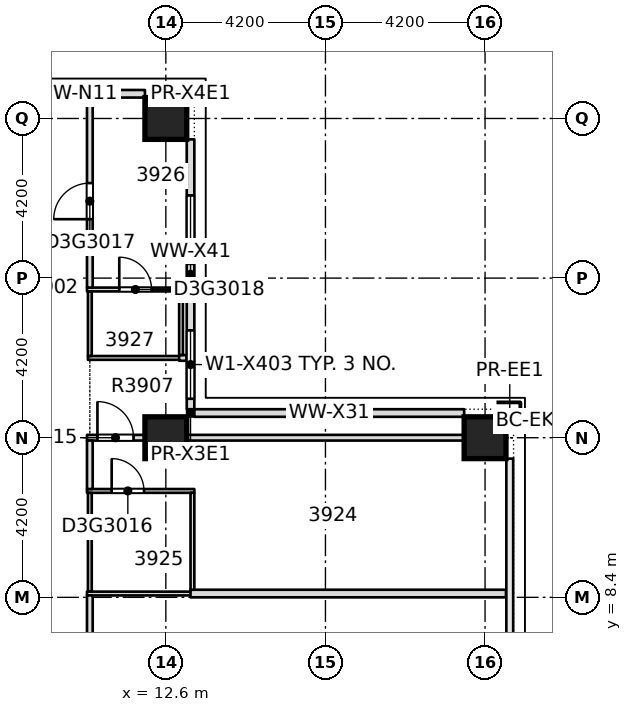
"""IFC4 building model, lengths in metres.
Left out: names, types, materials, properties, quantities, classifications, styles, units other than length and angle.
Written with IfcOpenShell. Run it as: python <this file> out.ifc"""

import sys

from ifc_helpers import new_model, si_unit, direction, frame, frame_2d, origin, origin_2d, place, context, subcontext, project, spatial, rectangle, extrude, element, fill, save


model = new_model("IFC4")
c1 = context("Model", 3, precision=1e-05, world=origin(), true_north=direction((0.0, 1.0)))
c2 = subcontext(c1, "Body", "Model", "MODEL_VIEW")
j1 = project(units=[si_unit("LENGTHUNIT", "METRE"), si_unit("PLANEANGLEUNIT", "RADIAN")], contexts=[c1])
p1 = place(None, origin())
s1 = spatial("IfcSite", under=j1, at=p1, CompositionType="ELEMENT")
p2 = place(p1, origin())
s2 = spatial("IfcBuilding", under=s1, at=p2, CompositionType="ELEMENT")
p3 = place(p2, frame((0.0, 0.0, 153.8)))
s3 = spatial("IfcBuildingStorey", under=s2, at=p3, CompositionType="ELEMENT", Elevation=153.8)
for number, where, z_axis, x_axis in (
    (1, (12.6, 12.6, -0.4), (0.0, 0.0, 1.0), (1.0, 0.0, 0.0)),
    (2, (21.0, 12.6, -0.4), (0.0, 0.0, 1.0), (1.0, 0.0, 0.0)),
    (3, (12.6, 21.0, -0.4), (0.0, 0.0, 1.0), (1.0, 0.0, 0.0)),
):
    element("IfcColumn", number, at=place(p3, frame(where, z_axis=z_axis, x_axis=x_axis)), inside=s3, PredefinedType="COLUMN", context=c2, shape_type="SweptSolid", body=[
        extrude(rectangle(XDim=1.1, YDim=1.1, at=origin_2d()), origin(), (0.0, 0.0, 1.0), 3.45),
    ])
p4 = place(p3, frame((10.525, 8.5, 0.0), z_axis=(0.0, 0.0, 1.0), x_axis=(1.0, 0.0, 0.0)))
e4 = element("IfcWall", 4, at=p4, inside=s3, PredefinedType="PARTITIONING", context=c2, shape_type="SweptSolid", body=[
    extrude(rectangle(XDim=2.825, YDim=0.1, at=frame_2d((1.413, 0.0))), origin(), (0.0, 0.0, 1.0), 3.05),
])
p5 = place(p3, frame((13.25, 8.5, 0.0), z_axis=(0.0, 0.0, 1.0), x_axis=(1.0, 0.0, 0.0)))
e5 = element("IfcWall", 5, at=p5, inside=s3, PredefinedType="PARTITIONING", context=c2, shape_type="SweptSolid", body=[
    extrude(rectangle(XDim=8.3, YDim=0.2, at=frame_2d((4.15, 0.0))), origin(), (0.0, 0.0, 1.0), 3.05),
])
p6 = place(p3, frame((10.525, 11.2, 0.0), z_axis=(0.0, 0.0, 1.0), x_axis=(1.0, 0.0, 0.0)))
e6 = element("IfcWall", 6, at=p6, inside=s3, PredefinedType="PARTITIONING", context=c2, shape_type="SweptSolid", body=[
    extrude(rectangle(XDim=2.825, YDim=0.1, at=frame_2d((1.413, 0.0))), origin(), (0.0, 0.0, 1.0), 3.05),
])
p7 = place(p6, frame((0.65, 0.0, 0.0)))
e7 = element("IfcOpeningElement", 7, at=p7, cuts=e6, PredefinedType="OPENING", context=c2, shape_type="SweptSolid", body=[
    extrude(rectangle(XDim=0.85, YDim=2.1, at=frame_2d((0.425, 1.05))), frame((0.0, 0.06, 0.0), z_axis=(0.0, -1.0, 0.0), x_axis=(1.0, 0.0, 0.0)), (0.0, 0.0, 1.0), 0.12),
])
p8 = place(p3, frame((10.525, 12.6, 0.0), z_axis=(0.0, 0.0, 1.0), x_axis=(1.0, 0.0, 0.0)))
e8 = element("IfcWall", 8, at=p8, inside=s3, PredefinedType="PARTITIONING", context=c2, shape_type="SweptSolid", body=[
    extrude(rectangle(XDim=2.625, YDim=0.15, at=frame_2d((1.312, 0.0))), origin(), (0.0, 0.0, 1.0), 3.05),
])
p9 = place(p8, frame((0.275, 0.0, 0.0)))
e9 = element("IfcOpeningElement", 9, at=p9, cuts=e8, PredefinedType="OPENING", context=c2, shape_type="SweptSolid", body=[
    extrude(rectangle(XDim=0.95, YDim=2.1, at=frame_2d((0.475, 1.05))), frame((0.0, 0.085, 0.0), z_axis=(0.0, -1.0, 0.0), x_axis=(1.0, 0.0, 0.0)), (0.0, 0.0, 1.0), 0.17),
])
p10 = place(p3, frame((10.55, 14.7, 0.0), z_axis=(0.0, 0.0, 1.0), x_axis=(1.0, 0.0, 0.0)))
e10 = element("IfcWall", 10, at=p10, inside=s3, PredefinedType="PARTITIONING", context=c2, shape_type="SweptSolid", body=[
    extrude(rectangle(XDim=2.5, YDim=0.1, at=frame_2d((1.25, 0.0))), origin(), (0.0, 0.0, 1.0), 3.05),
])
p11 = place(p3, frame((12.95, 14.7, 0.0), z_axis=(0.0, 0.0, 1.0), x_axis=(1.0, 0.0, 0.0)))
e11 = element("IfcWall", 11, at=p11, inside=s3, PredefinedType="PARTITIONING", context=c2, shape_type="SweptSolid", body=[
    extrude(rectangle(XDim=0.2, YDim=0.15, at=frame_2d((0.1, 0.0))), origin(), (0.0, 0.0, 1.0), 3.05),
])
p12 = place(p3, frame((10.525, 16.5, 0.0), z_axis=(0.0, 0.0, 1.0), x_axis=(1.0, 0.0, 0.0)))
e12 = element("IfcWall", 12, at=p12, inside=s3, PredefinedType="PARTITIONING", context=c2, shape_type="SweptSolid", body=[
    extrude(rectangle(XDim=2.525, YDim=0.1, at=frame_2d((1.263, 0.0))), origin(), (0.0, 0.0, 1.0), 3.05),
])
p13 = place(p12, frame((0.85, 0.0, 0.0)))
e13 = element("IfcOpeningElement", 13, at=p13, cuts=e12, PredefinedType="OPENING", context=c2, shape_type="SweptSolid", body=[
    extrude(rectangle(XDim=0.85, YDim=2.1, at=frame_2d((0.425, 1.05))), frame((0.0, 0.06, 0.0), z_axis=(0.0, -1.0, 0.0), x_axis=(1.0, 0.0, 0.0)), (0.0, 0.0, 1.0), 0.12),
])
p14 = place(p3, frame((10.6, -3.35, 0.0), z_axis=(0.0, 0.0, 1.0), x_axis=(0.0, 1.0, 0.0)))
e14 = element("IfcWall", 14, at=p14, inside=s3, PredefinedType="PARTITIONING", context=c2, shape_type="SweptSolid", body=[
    extrude(rectangle(XDim=11.8, YDim=0.15, at=frame_2d((5.9, 0.0))), origin(), (0.0, 0.0, 1.0), 3.05),
])
p15 = place(p14, frame((8.825, 0.0, 0.0)))
e15 = element("IfcOpeningElement", 15, at=p15, cuts=e14, PredefinedType="OPENING", context=c2, shape_type="SweptSolid", body=[
    extrude(rectangle(XDim=0.95, YDim=2.1, at=frame_2d((0.475, 1.05))), frame((0.0, 0.085, 0.0), z_axis=(0.0, -1.0, 0.0), x_axis=(1.0, 0.0, 0.0)), (0.0, 0.0, 1.0), 0.17),
])
p16 = place(p14, frame((2.8, 0.0, 0.0)))
e16 = element("IfcOpeningElement", 16, at=p16, cuts=e14, PredefinedType="OPENING", context=c2, shape_type="SweptSolid", body=[
    extrude(rectangle(XDim=1.1, YDim=2.1, at=frame_2d((0.55, 1.05))), frame((0.0, 0.085, 0.0), z_axis=(0.0, -1.0, 0.0), x_axis=(1.0, 0.0, 0.0)), (0.0, 0.0, 1.0), 0.17),
])
p17 = place(p14, frame((0.65, 0.0, 0.0)))
e17 = element("IfcOpeningElement", 17, at=p17, cuts=e14, PredefinedType="OPENING", context=c2, shape_type="SweptSolid", body=[
    extrude(rectangle(XDim=1.0, YDim=2.1, at=frame_2d((0.5, 1.05))), frame((0.0, 0.085, 0.0), z_axis=(0.0, -1.0, 0.0), x_axis=(1.0, 0.0, 0.0)), (0.0, 0.0, 1.0), 0.17),
])
p18 = place(p14, frame((5.05, 0.0, 0.0)))
e18 = element("IfcOpeningElement", 18, at=p18, cuts=e14, PredefinedType="OPENING", context=c2, shape_type="SweptSolid", body=[
    extrude(rectangle(XDim=1.0, YDim=2.1, at=frame_2d((0.5, 1.05))), frame((0.0, 0.085, 0.0), z_axis=(0.0, -1.0, 0.0), x_axis=(1.0, 0.0, 0.0)), (0.0, 0.0, 1.0), 0.17),
])
p19 = place(p3, frame((10.6, 8.55, 0.0), z_axis=(0.0, 0.0, 1.0), x_axis=(0.0, 1.0, 0.0)))
e19 = element("IfcWall", 19, at=p19, inside=s3, PredefinedType="PARTITIONING", context=c2, shape_type="SweptSolid", body=[
    extrude(rectangle(XDim=2.6, YDim=0.1, at=frame_2d((1.3, 0.0))), origin(), (0.0, 0.0, 1.0), 3.05),
])
p20 = place(p3, frame((10.6, 11.25, 0.0), z_axis=(0.0, 0.0, 1.0), x_axis=(0.0, 1.0, 0.0)))
e20 = element("IfcWall", 20, at=p20, inside=s3, PredefinedType="PARTITIONING", context=c2, shape_type="SweptSolid", body=[
    extrude(rectangle(XDim=1.275, YDim=0.15, at=frame_2d((0.637, 0.0))), origin(), (0.0, 0.0, 1.0), 3.05),
])
p21 = place(p3, frame((10.6, 14.75, 0.0), z_axis=(0.0, 0.0, 1.0), x_axis=(0.0, 1.0, 0.0)))
e21 = element("IfcWall", 21, at=p21, inside=s3, PredefinedType="PARTITIONING", context=c2, shape_type="SweptSolid", body=[
    extrude(rectangle(XDim=1.7, YDim=0.1, at=frame_2d((0.85, 0.0))), origin(), (0.0, 0.0, 1.0), 3.05),
])
p22 = place(p3, frame((10.6, 16.55, 0.0), z_axis=(0.0, 0.0, 1.0), x_axis=(0.0, 1.0, 0.0)))
e22 = element("IfcWall", 22, at=p22, inside=s3, PredefinedType="PARTITIONING", context=c2, shape_type="SweptSolid", body=[
    extrude(rectangle(XDim=5.0, YDim=0.15, at=frame_2d((2.5, 0.0))), origin(), (0.0, 0.0, 1.0), 3.05),
])
p23 = place(p22, frame((1.8, 0.0, 0.0)))
e23 = element("IfcOpeningElement", 23, at=p23, cuts=e22, PredefinedType="OPENING", context=c2, shape_type="SweptSolid", body=[
    extrude(rectangle(XDim=0.95, YDim=2.1, at=frame_2d((0.475, 1.05))), frame((0.0, 0.085, 0.0), z_axis=(0.0, -1.0, 0.0), x_axis=(1.0, 0.0, 0.0)), (0.0, 0.0, 1.0), 0.17),
])
p24 = place(p3, frame((13.0, 14.775, 0.0), z_axis=(0.0, 0.0, 1.0), x_axis=(0.0, 1.0, 0.0)))
e24 = element("IfcWall", 24, at=p24, inside=s3, PredefinedType="PARTITIONING", context=c2, shape_type="SweptSolid", body=[
    extrude(rectangle(XDim=1.675, YDim=0.1, at=frame_2d((0.837, 0.0))), origin(), (0.0, 0.0, 1.0), 3.05),
])
p25 = place(p3, frame((13.3, 8.6, 0.0), z_axis=(0.0, 0.0, 1.0), x_axis=(0.0, 1.0, 0.0)))
e25 = element("IfcWall", 25, at=p25, inside=s3, PredefinedType="PARTITIONING", context=c2, shape_type="SweptSolid", body=[
    extrude(rectangle(XDim=2.55, YDim=0.1, at=frame_2d((1.275, 0.0))), origin(), (0.0, 0.0, 1.0), 3.05),
])
p26 = place(p3, frame((20.45, 13.25, 0.0), z_axis=(0.0, 0.0, 1.0), x_axis=(-1.0, 0.0, 0.0)))
e26 = element("IfcWall", 26, at=p26, inside=s3, PredefinedType="STANDARD", context=c2, shape_type="SweptSolid", body=[
    extrude(rectangle(XDim=7.1, YDim=0.2, at=frame_2d((3.55, 0.0))), origin(), (0.0, 0.0, 1.0), 3.05),
])
p27 = place(p3, frame((13.25, 13.35, 0.0), z_axis=(0.0, 0.0, 1.0), x_axis=(0.0, 1.0, 0.0)))
e27 = element("IfcWall", 27, at=p27, inside=s3, PredefinedType="STANDARD", context=c2, shape_type="SweptSolid", body=[
    extrude(rectangle(XDim=7.1, YDim=0.2, at=frame_2d((3.55, 0.0))), origin(), (0.0, 0.0, 1.0), 3.05),
])
p28 = place(p27, frame((0.275, 0.0, 0.2)))
e28 = element("IfcOpeningElement", 28, at=p28, cuts=e27, PredefinedType="OPENING", context=c2, shape_type="SweptSolid", body=[
    extrude(rectangle(XDim=1.8, YDim=2.65, at=frame_2d((0.9, 1.325))), frame((0.0, 0.11, 0.0), z_axis=(0.0, -1.0, 0.0), x_axis=(1.0, 0.0, 0.0)), (0.0, 0.0, 1.0), 0.22),
])
p29 = place(p27, frame((3.825, 0.0, 0.2)))
e29 = element("IfcOpeningElement", 29, at=p29, cuts=e27, PredefinedType="OPENING", context=c2, shape_type="SweptSolid", body=[
    extrude(rectangle(XDim=1.8, YDim=2.65, at=frame_2d((0.9, 1.325))), frame((0.0, 0.11, 0.0), z_axis=(0.0, -1.0, 0.0), x_axis=(1.0, 0.0, 0.0)), (0.0, 0.0, 1.0), 0.22),
])
p30 = place(p3, frame((12.05, 21.65, 0.0), z_axis=(0.0, 0.0, 1.0), x_axis=(-1.0, 0.0, 0.0)))
e30 = element("IfcWall", 30, at=p30, inside=s3, PredefinedType="STANDARD", context=c2, shape_type="SweptSolid", body=[
    extrude(rectangle(XDim=3.65, YDim=0.2, at=frame_2d((1.825, 0.0))), origin(), (0.0, 0.0, 1.0), 3.05),
])
p31 = place(p30, frame((1.67, 0.0, 0.2)))
e31 = element("IfcOpeningElement", 31, at=p31, cuts=e30, PredefinedType="OPENING", context=c2, shape_type="SweptSolid", body=[
    extrude(rectangle(XDim=1.8, YDim=2.65, at=frame_2d((0.9, 1.325))), frame((0.0, 0.11, 0.0), z_axis=(0.0, -1.0, 0.0), x_axis=(1.0, 0.0, 0.0)), (0.0, 0.0, 1.0), 0.22),
])
p32 = place(p3, frame((13.15, 12.6, 0.0), z_axis=(0.0, 0.0, 1.0), x_axis=(1.0, 0.0, 0.0)))
e32 = element("IfcWall", 32, at=p32, inside=s3, PredefinedType="PARTITIONING", context=c2, shape_type="SweptSolid", body=[
    extrude(rectangle(XDim=7.3, YDim=0.15, at=frame_2d((3.65, 0.0))), origin(), (0.0, 0.0, 1.0), 2.5),
])
p33 = place(p3, frame((20.45, 12.6, 0.0), z_axis=(0.0, 0.0, 1.0), x_axis=(1.0, 0.0, 0.0)))
e33 = element("IfcWall", 33, at=p33, inside=s3, PredefinedType="PARTITIONING", context=c2, shape_type="SweptSolid", body=[
    extrude(rectangle(XDim=1.1, YDim=0.15, at=frame_2d((0.55, 0.0))), origin(), (0.0, 0.0, 1.0), 3.05),
])
p34 = place(p9, origin())
e34 = element("IfcDoor", 34, at=p34, inside=s3, OperationType="SINGLE_SWING_RIGHT", PredefinedType="DOOR", context=c2, shape_type="SweptSolid", body=[
    extrude(rectangle(XDim=0.95, YDim=2.1, at=frame_2d((0.475, 1.05))), frame((0.0, 0.025, 0.0), z_axis=(0.0, -1.0, 0.0), x_axis=(1.0, 0.0, 0.0)), (0.0, 0.0, 1.0), 0.05),
])
fill(e9, e34)
p35 = place(p7, origin())
e35 = element("IfcDoor", 35, at=p35, inside=s3, OperationType="SINGLE_SWING_RIGHT", PredefinedType="DOOR", context=c2, shape_type="SweptSolid", body=[
    extrude(rectangle(XDim=0.85, YDim=2.1, at=frame_2d((0.425, 1.05))), frame((0.0, 0.025, 0.0), z_axis=(0.0, -1.0, 0.0), x_axis=(1.0, 0.0, 0.0)), (0.0, 0.0, 1.0), 0.05),
])
fill(e7, e35)
p36 = place(p23, origin())
e36 = element("IfcDoor", 36, at=p36, inside=s3, OperationType="SINGLE_SWING_LEFT", PredefinedType="DOOR", context=c2, shape_type="SweptSolid", body=[
    extrude(rectangle(XDim=0.95, YDim=2.1, at=frame_2d((0.475, 1.05))), frame((0.0, 0.025, 0.0), z_axis=(0.0, -1.0, 0.0), x_axis=(1.0, 0.0, 0.0)), (0.0, 0.0, 1.0), 0.05),
])
fill(e23, e36)
p37 = place(p13, origin())
e37 = element("IfcDoor", 37, at=p37, inside=s3, OperationType="SINGLE_SWING_RIGHT", PredefinedType="DOOR", context=c2, shape_type="SweptSolid", body=[
    extrude(rectangle(XDim=0.85, YDim=2.1, at=frame_2d((0.425, 1.05))), frame((0.0, 0.025, 0.0), z_axis=(0.0, -1.0, 0.0), x_axis=(1.0, 0.0, 0.0)), (0.0, 0.0, 1.0), 0.05),
])
fill(e13, e37)
p38 = place(p28, origin())
e38 = element("IfcWindow", 38, at=p38, inside=s3, PartitioningType="SINGLE_PANEL", PredefinedType="WINDOW", context=c2, shape_type="SweptSolid", body=[
    extrude(rectangle(XDim=1.8, YDim=2.65, at=frame_2d((0.9, 1.325))), frame((0.0, 0.03, 0.0), z_axis=(0.0, -1.0, 0.0), x_axis=(1.0, 0.0, 0.0)), (0.0, 0.0, 1.0), 0.06),
])
fill(e28, e38)
p39 = place(p29, origin())
e39 = element("IfcWindow", 39, at=p39, inside=s3, PartitioningType="SINGLE_PANEL", PredefinedType="WINDOW", context=c2, shape_type="SweptSolid", body=[
    extrude(rectangle(XDim=1.8, YDim=2.65, at=frame_2d((0.9, 1.325))), frame((0.0, 0.03, 0.0), z_axis=(0.0, -1.0, 0.0), x_axis=(1.0, 0.0, 0.0)), (0.0, 0.0, 1.0), 0.06),
])
fill(e29, e39)
p40 = place(p31, origin())
e40 = element("IfcWindow", 40, at=p40, inside=s3, PartitioningType="SINGLE_PANEL", PredefinedType="WINDOW", context=c2, shape_type="SweptSolid", body=[
    extrude(rectangle(XDim=1.8, YDim=2.65, at=frame_2d((0.9, 1.325))), frame((0.0, 0.03, 0.0), z_axis=(0.0, -1.0, 0.0), x_axis=(1.0, 0.0, 0.0)), (0.0, 0.0, 1.0), 0.06),
])
fill(e31, e40)
save(model, sys.argv[1])
